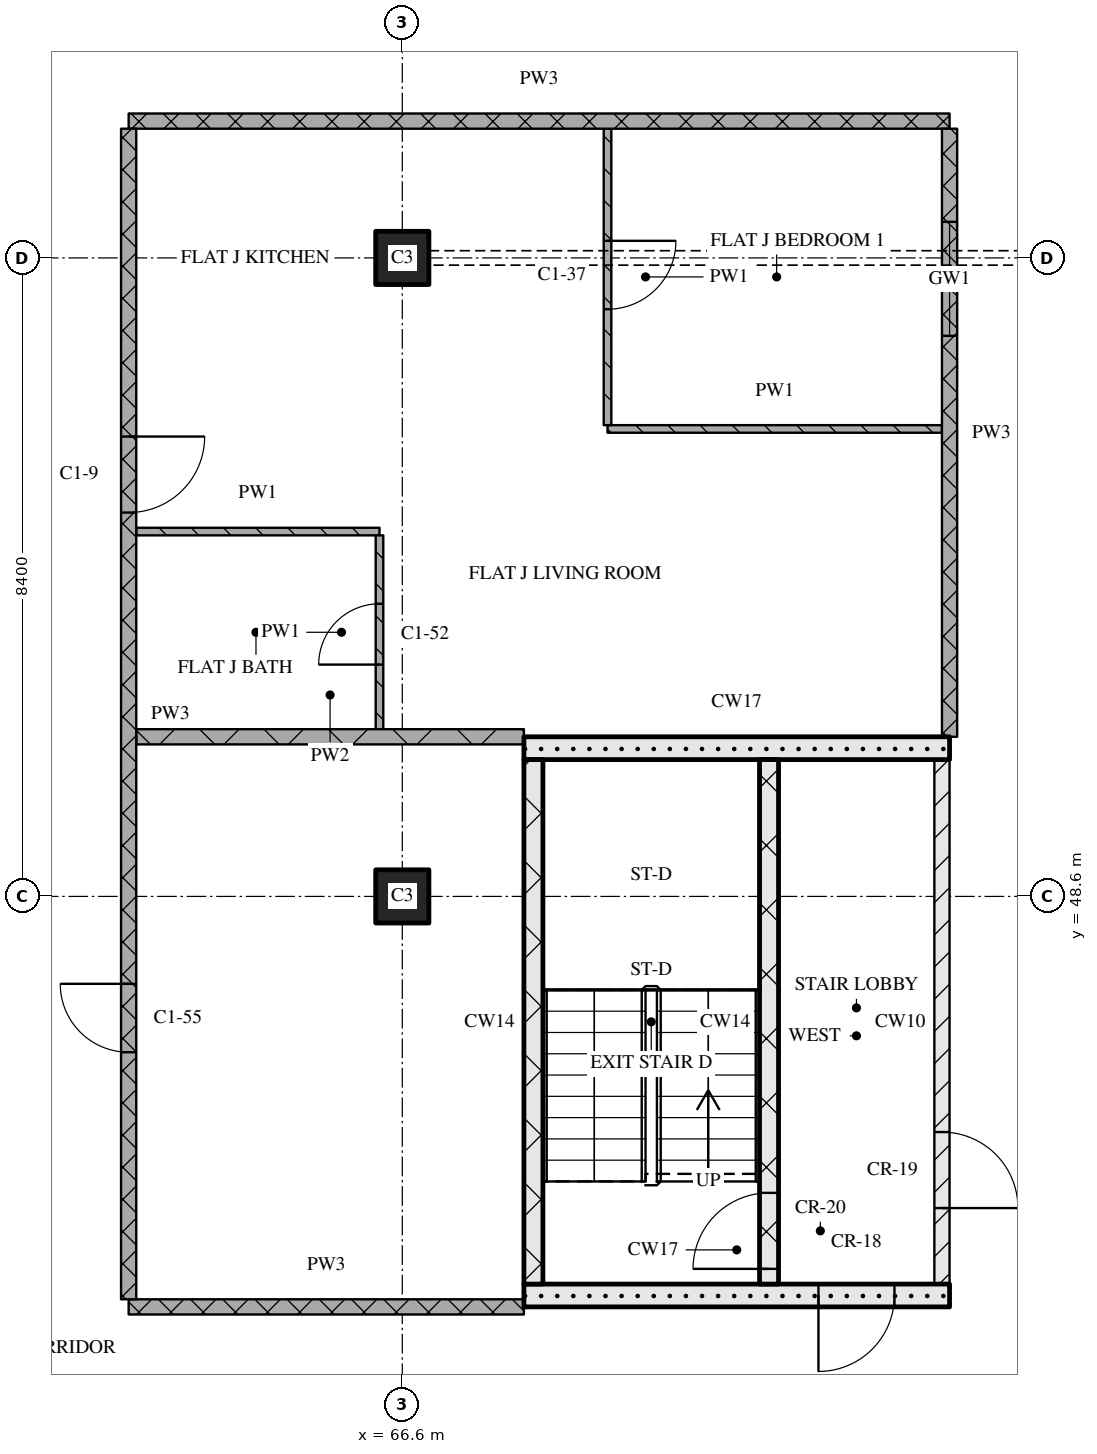
"""IFC4 building model, lengths in metres.
Left out: names, types, materials, properties, quantities, classifications, styles, units other than length and angle.
Written with IfcOpenShell. Run it as: python <this file> out.ifc"""

import sys

from ifc_helpers import new_model, si_unit, direction, frame, frame_2d, origin, origin_2d, place, context, subcontext, project, spatial, rectangle, extrude, element, fill, save


model = new_model("IFC4")
c1 = context("Model", 3, precision=1e-05, world=origin(), true_north=direction((0.0, 1.0)))
c2 = subcontext(c1, "Body", "Model", "MODEL_VIEW")
j1 = project(units=[si_unit("LENGTHUNIT", "METRE"), si_unit("PLANEANGLEUNIT", "RADIAN")], contexts=[c1])
p1 = place(None, origin())
s1 = spatial("IfcSite", under=j1, at=p1, CompositionType="ELEMENT")
p2 = place(p1, origin())
s2 = spatial("IfcBuilding", under=s1, at=p2, CompositionType="ELEMENT")
p3 = place(p2, frame((0.0, 0.0, 154.65)))
s3 = spatial("IfcBuildingStorey", under=s2, at=p3, CompositionType="ELEMENT", Elevation=154.65)
for number, where, z_axis, x_axis in (
    (1, (66.6, 48.6, 0.0), (0.0, 0.0, 1.0), (1.0, 0.0, 0.0)),
    (2, (66.6, 57.0, 0.0), (0.0, 0.0, 1.0), (1.0, 0.0, 0.0)),
):
    element("IfcColumn", number, at=place(p3, frame(where, z_axis=z_axis, x_axis=x_axis)), inside=s3, PredefinedType="COLUMN", context=c2, shape_type="SweptSolid", body=[
        extrude(rectangle(XDim=0.7, YDim=0.7, at=origin_2d()), origin(), (0.0, 0.0, 1.0), 3.6),
    ])
p4 = place(p3, frame((68.2, 43.35, 0.0), z_axis=(0.0, 0.0, 1.0), x_axis=(1.0, 0.0, 0.0)))
e3 = element("IfcWall", 3, at=p4, inside=s3, PredefinedType="SOLIDWALL", context=c2, shape_type="SweptSolid", body=[
    extrude(rectangle(XDim=5.6, YDim=0.3, at=frame_2d((2.8, 0.0))), origin(), (0.0, 0.0, 1.0), 3.32),
])
p5 = place(p4, frame((3.875, 0.0, 0.0)))
e4 = element("IfcOpeningElement", 4, at=p5, cuts=e3, PredefinedType="OPENING", context=c2, shape_type="SweptSolid", body=[
    extrude(rectangle(XDim=1.0, YDim=2.1, at=frame_2d((0.5, 1.05))), frame((0.0, 0.16, 0.0), z_axis=(0.0, -1.0, 0.0), x_axis=(1.0, 0.0, 0.0)), (0.0, 0.0, 1.0), 0.32),
])
p6 = place(p3, frame((68.325, 43.5, 0.0), z_axis=(0.0, 0.0, 1.0), x_axis=(0.0, 1.0, 0.0)))
e5 = element("IfcWall", 5, at=p6, inside=s3, PredefinedType="SOLIDWALL", context=c2, shape_type="SweptSolid", body=[
    extrude(rectangle(XDim=6.9, YDim=0.25, at=frame_2d((3.45, 0.0))), origin(), (0.0, 0.0, 1.0), 3.32),
])
p7 = place(p3, frame((71.425, 43.5, 0.0), z_axis=(0.0, 0.0, 1.0), x_axis=(0.0, 1.0, 0.0)))
e6 = element("IfcWall", 6, at=p7, inside=s3, PredefinedType="SOLIDWALL", context=c2, shape_type="SweptSolid", body=[
    extrude(rectangle(XDim=6.9, YDim=0.25, at=frame_2d((3.45, 0.0))), origin(), (0.0, 0.0, 1.0), 3.32),
])
p8 = place(p7, frame((0.2, 0.0, 0.0)))
e7 = element("IfcOpeningElement", 7, at=p8, cuts=e6, PredefinedType="OPENING", context=c2, shape_type="SweptSolid", body=[
    extrude(rectangle(XDim=1.0, YDim=2.1, at=frame_2d((0.5, 1.05))), frame((0.0, 0.135, 0.0), z_axis=(0.0, -1.0, 0.0), x_axis=(1.0, 0.0, 0.0)), (0.0, 0.0, 1.0), 0.27),
])
p9 = place(p3, frame((73.7, 43.5, 0.0), z_axis=(0.0, 0.0, 1.0), x_axis=(0.0, 1.0, 0.0)))
e8 = element("IfcWall", 8, at=p9, inside=s3, PredefinedType="PARTITIONING", context=c2, shape_type="SweptSolid", body=[
    extrude(rectangle(XDim=6.9, YDim=0.2, at=frame_2d((3.45, 0.0))), origin(), (0.0, 0.0, 1.0), 3.32),
])
p10 = place(p9, frame((1.0, 0.0, 0.0)))
e9 = element("IfcOpeningElement", 9, at=p10, cuts=e8, PredefinedType="OPENING", context=c2, shape_type="SweptSolid", body=[
    extrude(rectangle(XDim=1.0, YDim=2.1, at=frame_2d((0.5, 1.05))), frame((0.0, 0.11, 0.0), z_axis=(0.0, -1.0, 0.0), x_axis=(1.0, 0.0, 0.0)), (0.0, 0.0, 1.0), 0.22),
])
p11 = place(p3, frame((68.2, 50.55, 0.0), z_axis=(0.0, 0.0, 1.0), x_axis=(1.0, 0.0, 0.0)))
e10 = element("IfcWall", 10, at=p11, inside=s3, PredefinedType="SOLIDWALL", context=c2, shape_type="SweptSolid", body=[
    extrude(rectangle(XDim=5.6, YDim=0.3, at=frame_2d((2.8, 0.0))), origin(), (0.0, 0.0, 1.0), 3.32),
])
p12 = place(p3, frame((63.0, 43.2, 0.0), z_axis=(0.0, 0.0, 1.0), x_axis=(1.0, 0.0, 0.0)))
e11 = element("IfcWall", 11, at=p12, inside=s3, PredefinedType="PARTITIONING", context=c2, shape_type="SweptSolid", body=[
    extrude(rectangle(XDim=5.2, YDim=0.2, at=frame_2d((2.6, 0.0))), origin(), (0.0, 0.0, 1.0), 3.32),
])
p13 = place(p3, frame((63.1, 50.7, 0.0), z_axis=(0.0, 0.0, 1.0), x_axis=(1.0, 0.0, 0.0)))
e12 = element("IfcWall", 12, at=p13, inside=s3, PredefinedType="PARTITIONING", context=c2, shape_type="SweptSolid", body=[
    extrude(rectangle(XDim=5.1, YDim=0.2, at=frame_2d((2.55, 0.0))), origin(), (0.0, 0.0, 1.0), 3.32),
])
p14 = place(p3, frame((63.1, 53.4, 0.0), z_axis=(0.0, 0.0, 1.0), x_axis=(1.0, 0.0, 0.0)))
e13 = element("IfcWall", 13, at=p14, inside=s3, PredefinedType="PARTITIONING", context=c2, shape_type="SweptSolid", body=[
    extrude(rectangle(XDim=3.2, YDim=0.1, at=frame_2d((1.6, 0.0))), origin(), (0.0, 0.0, 1.0), 3.32),
])
p15 = place(p3, frame((69.3, 54.75, 0.0), z_axis=(0.0, 0.0, 1.0), x_axis=(1.0, 0.0, 0.0)))
e14 = element("IfcWall", 14, at=p15, inside=s3, PredefinedType="PARTITIONING", context=c2, shape_type="SweptSolid", body=[
    extrude(rectangle(XDim=4.4, YDim=0.1, at=frame_2d((2.2, 0.0))), origin(), (0.0, 0.0, 1.0), 3.32),
])
p16 = place(p3, frame((63.0, 58.8, 0.0), z_axis=(0.0, 0.0, 1.0), x_axis=(1.0, 0.0, 0.0)))
e15 = element("IfcWall", 15, at=p16, inside=s3, PredefinedType="PARTITIONING", context=c2, shape_type="SweptSolid", body=[
    extrude(rectangle(XDim=10.8, YDim=0.2, at=frame_2d((5.4, 0.0))), origin(), (0.0, 0.0, 1.0), 3.32),
])
p17 = place(p3, frame((63.0, 58.7, 0.0), z_axis=(0.0, 0.0, 1.0), x_axis=(0.0, -1.0, 0.0)))
e16 = element("IfcWall", 16, at=p17, inside=s3, PredefinedType="PARTITIONING", context=c2, shape_type="SweptSolid", body=[
    extrude(rectangle(XDim=15.4, YDim=0.2, at=frame_2d((7.7, 0.0))), origin(), (0.0, 0.0, 1.0), 3.32),
])
p18 = place(p17, frame((4.05, 0.0, 0.0)))
e17 = element("IfcOpeningElement", 17, at=p18, cuts=e16, PredefinedType="OPENING", context=c2, shape_type="SweptSolid", body=[
    extrude(rectangle(XDim=1.0, YDim=2.1, at=frame_2d((0.5, 1.05))), frame((0.0, 0.11, 0.0), z_axis=(0.0, -1.0, 0.0), x_axis=(1.0, 0.0, 0.0)), (0.0, 0.0, 1.0), 0.22),
])
p19 = place(p17, frame((11.25, 0.0, 0.0)))
e18 = element("IfcOpeningElement", 18, at=p19, cuts=e16, PredefinedType="OPENING", context=c2, shape_type="SweptSolid", body=[
    extrude(rectangle(XDim=0.9, YDim=2.1, at=frame_2d((0.45, 1.05))), frame((0.0, 0.11, 0.0), z_axis=(0.0, -1.0, 0.0), x_axis=(1.0, 0.0, 0.0)), (0.0, 0.0, 1.0), 0.22),
])
p20 = place(p3, frame((66.3, 50.8, 0.0), z_axis=(0.0, 0.0, 1.0), x_axis=(0.0, 1.0, 0.0)))
e19 = element("IfcWall", 19, at=p20, inside=s3, PredefinedType="PARTITIONING", context=c2, shape_type="SweptSolid", body=[
    extrude(rectangle(XDim=2.55, YDim=0.1, at=frame_2d((1.275, 0.0))), origin(), (0.0, 0.0, 1.0), 3.32),
])
p21 = place(p20, frame((0.85, 0.0, 0.0)))
e20 = element("IfcOpeningElement", 20, at=p21, cuts=e19, PredefinedType="OPENING", context=c2, shape_type="SweptSolid", body=[
    extrude(rectangle(XDim=0.8, YDim=2.1, at=frame_2d((0.4, 1.05))), frame((0.0, 0.06, 0.0), z_axis=(0.0, -1.0, 0.0), x_axis=(1.0, 0.0, 0.0)), (0.0, 0.0, 1.0), 0.12),
])
p22 = place(p3, frame((69.3, 58.7, 0.0), z_axis=(0.0, 0.0, 1.0), x_axis=(0.0, -1.0, 0.0)))
e21 = element("IfcWall", 21, at=p22, inside=s3, PredefinedType="PARTITIONING", context=c2, shape_type="SweptSolid", body=[
    extrude(rectangle(XDim=3.9, YDim=0.1, at=frame_2d((1.95, 0.0))), origin(), (0.0, 0.0, 1.0), 3.32),
])
p23 = place(p22, frame((1.475, 0.0, 0.0)))
e22 = element("IfcOpeningElement", 22, at=p23, cuts=e21, PredefinedType="OPENING", context=c2, shape_type="SweptSolid", body=[
    extrude(rectangle(XDim=0.9, YDim=2.1, at=frame_2d((0.45, 1.05))), frame((0.0, 0.06, 0.0), z_axis=(0.0, -1.0, 0.0), x_axis=(1.0, 0.0, 0.0)), (0.0, 0.0, 1.0), 0.12),
])
p24 = place(p3, frame((73.8, 58.7, 0.0), z_axis=(0.0, 0.0, 1.0), x_axis=(0.0, -1.0, 0.0)))
e23 = element("IfcWall", 23, at=p24, inside=s3, PredefinedType="PARTITIONING", context=c2, shape_type="SweptSolid", body=[
    extrude(rectangle(XDim=8.0, YDim=0.2, at=frame_2d((4.0, 0.0))), origin(), (0.0, 0.0, 1.0), 3.32),
])
p25 = place(p24, frame((1.225, 0.0, 0.9)))
e24 = element("IfcOpeningElement", 24, at=p25, cuts=e23, PredefinedType="OPENING", context=c2, shape_type="SweptSolid", body=[
    extrude(rectangle(XDim=1.5, YDim=1.5, at=frame_2d((0.75, 0.75))), frame((0.0, 0.11, 0.0), z_axis=(0.0, -1.0, 0.0), x_axis=(1.0, 0.0, 0.0)), (0.0, 0.0, 1.0), 0.22),
])
p26 = place(p5, origin())
e25 = element("IfcDoor", 25, at=p26, inside=s3, OperationType="SINGLE_SWING_RIGHT", PredefinedType="DOOR", context=c2, shape_type="SweptSolid", body=[
    extrude(rectangle(XDim=1.0, YDim=2.1, at=frame_2d((0.5, 1.05))), frame((0.0, 0.025, 0.0), z_axis=(0.0, -1.0, 0.0), x_axis=(1.0, 0.0, 0.0)), (0.0, 0.0, 1.0), 0.05),
])
fill(e4, e25)
p27 = place(p8, origin())
e26 = element("IfcDoor", 26, at=p27, inside=s3, OperationType="SINGLE_SWING_LEFT", PredefinedType="DOOR", context=c2, shape_type="SweptSolid", body=[
    extrude(rectangle(XDim=1.0, YDim=2.1, at=frame_2d((0.5, 1.05))), frame((0.0, 0.025, 0.0), z_axis=(0.0, -1.0, 0.0), x_axis=(1.0, 0.0, 0.0)), (0.0, 0.0, 1.0), 0.05),
])
fill(e7, e26)
p28 = place(p10, origin())
e27 = element("IfcDoor", 27, at=p28, inside=s3, OperationType="SINGLE_SWING_RIGHT", PredefinedType="DOOR", context=c2, shape_type="SweptSolid", body=[
    extrude(rectangle(XDim=1.0, YDim=2.1, at=frame_2d((0.5, 1.05))), frame((0.0, 0.025, 0.0), z_axis=(0.0, -1.0, 0.0), x_axis=(1.0, 0.0, 0.0)), (0.0, 0.0, 1.0), 0.05),
])
fill(e9, e27)
p29 = place(p18, origin())
e28 = element("IfcDoor", 28, at=p29, inside=s3, OperationType="SINGLE_SWING_LEFT", PredefinedType="DOOR", context=c2, shape_type="SweptSolid", body=[
    extrude(rectangle(XDim=1.0, YDim=2.1, at=frame_2d((0.5, 1.05))), frame((0.0, 0.025, 0.0), z_axis=(0.0, -1.0, 0.0), x_axis=(1.0, 0.0, 0.0)), (0.0, 0.0, 1.0), 0.05),
])
fill(e17, e28)
p30 = place(p19, origin())
e29 = element("IfcDoor", 29, at=p30, inside=s3, OperationType="SINGLE_SWING_RIGHT", PredefinedType="DOOR", context=c2, shape_type="SweptSolid", body=[
    extrude(rectangle(XDim=0.9, YDim=2.1, at=frame_2d((0.45, 1.05))), frame((0.0, 0.025, 0.0), z_axis=(0.0, -1.0, 0.0), x_axis=(1.0, 0.0, 0.0)), (0.0, 0.0, 1.0), 0.05),
])
fill(e18, e29)
p31 = place(p21, origin())
e30 = element("IfcDoor", 30, at=p31, inside=s3, OperationType="SINGLE_SWING_LEFT", PredefinedType="DOOR", context=c2, shape_type="SweptSolid", body=[
    extrude(rectangle(XDim=0.8, YDim=2.1, at=frame_2d((0.4, 1.05))), frame((0.0, 0.025, 0.0), z_axis=(0.0, -1.0, 0.0), x_axis=(1.0, 0.0, 0.0)), (0.0, 0.0, 1.0), 0.05),
])
fill(e20, e30)
p32 = place(p23, origin())
e31 = element("IfcDoor", 31, at=p32, inside=s3, OperationType="SINGLE_SWING_LEFT", PredefinedType="DOOR", context=c2, shape_type="SweptSolid", body=[
    extrude(rectangle(XDim=0.9, YDim=2.1, at=frame_2d((0.45, 1.05))), frame((0.0, 0.025, 0.0), z_axis=(0.0, -1.0, 0.0), x_axis=(1.0, 0.0, 0.0)), (0.0, 0.0, 1.0), 0.05),
])
fill(e22, e31)
p33 = place(p25, origin())
e32 = element("IfcWindow", 32, at=p33, inside=s3, PartitioningType="SINGLE_PANEL", PredefinedType="WINDOW", context=c2, shape_type="SweptSolid", body=[
    extrude(rectangle(XDim=1.5, YDim=1.5, at=frame_2d((0.75, 0.75))), frame((0.0, 0.03, 0.0), z_axis=(0.0, -1.0, 0.0), x_axis=(1.0, 0.0, 0.0)), (0.0, 0.0, 1.0), 0.06),
])
fill(e24, e32)
save(model, sys.argv[1])
